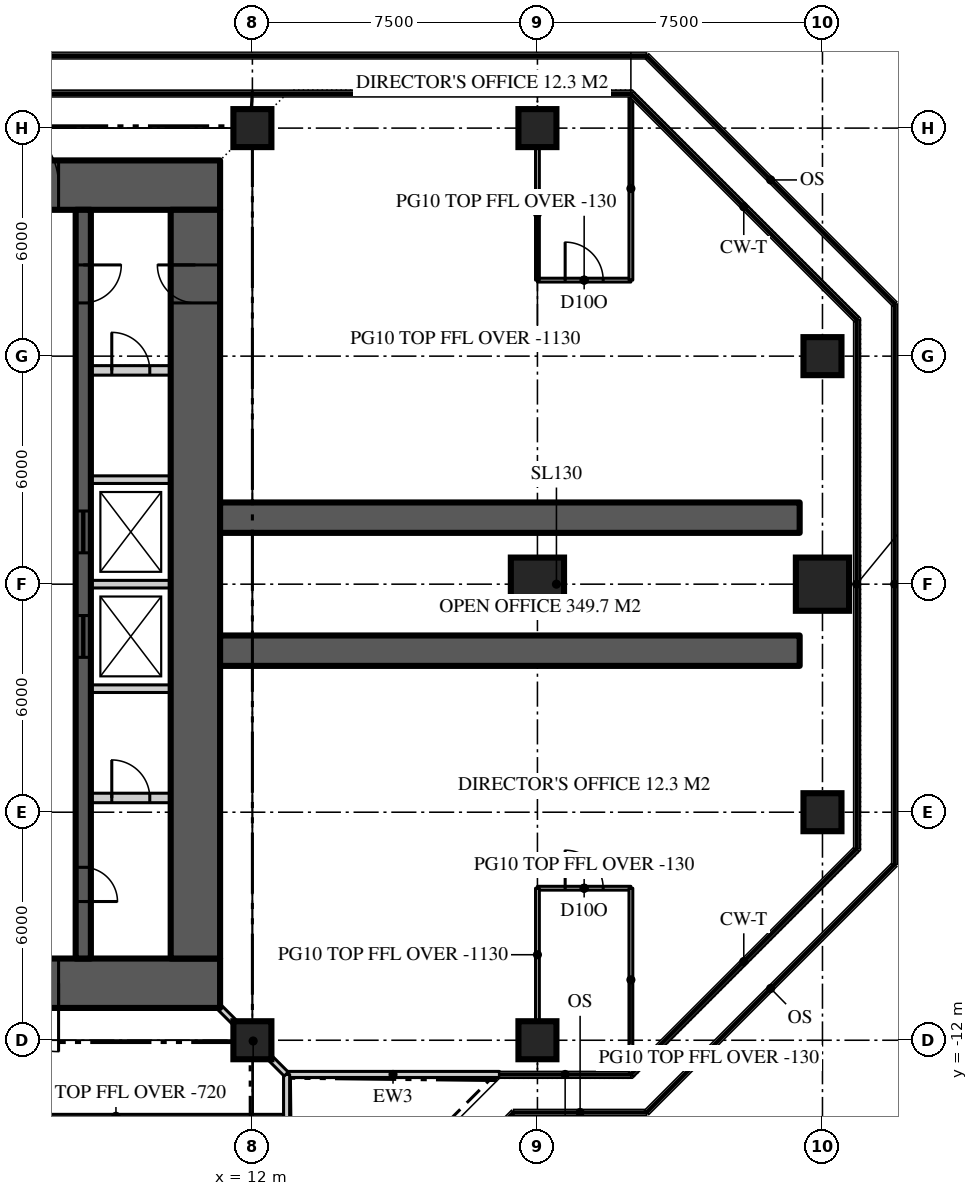
"""IFC4 building model, lengths in metres.
Left out: names, types, materials, properties, quantities, classifications, styles, units other than length and angle.
Written with IfcOpenShell. Run it as: python <this file> out.ifc"""

import sys

from ifc_helpers import new_model, si_unit, direction, frame, frame_2d, origin, origin_2d, place, context, subcontext, project, spatial, rectangle, extrude, element, fill, save


model = new_model("IFC4")
c1 = context("Model", 3, precision=1e-05, world=origin(), true_north=direction((0.0, 1.0)))
c2 = subcontext(c1, "Body", "Model", "MODEL_VIEW")
j1 = project(units=[si_unit("LENGTHUNIT", "METRE"), si_unit("PLANEANGLEUNIT", "RADIAN")], contexts=[c1])
p1 = place(None, origin())
s1 = spatial("IfcSite", under=j1, at=p1, CompositionType="ELEMENT")
p2 = place(p1, origin())
s2 = spatial("IfcBuilding", under=s1, at=p2, CompositionType="ELEMENT")
p3 = place(p2, frame((0.0, 0.0, 286.8)))
s3 = spatial("IfcBuildingStorey", under=s2, at=p3, CompositionType="ELEMENT", Elevation=286.8)
p4 = place(p3, frame((-11.15, 10.5, 0.0), z_axis=(0.0, 0.0, 1.0), x_axis=(1.0, 0.0, 0.0)))
e1 = element("IfcWall", 1, at=p4, inside=s3, PredefinedType="SHEAR", context=c2, shape_type="SweptSolid", body=[
    extrude(rectangle(XDim=22.3, YDim=1.3, at=frame_2d((11.15, 0.0))), origin(), (0.0, 0.0, 1.0), 3.9),
])
p5 = place(p4, frame((4.25, 0.0, 0.0)))
e2 = element("IfcOpeningElement", 2, at=p5, cuts=e1, PredefinedType="OPENING", context=c2, shape_type="SweptSolid", body=[
    extrude(rectangle(XDim=1.8, YDim=2.2, at=frame_2d((0.9, 1.1))), frame((0.0, 0.66, 0.0), z_axis=(0.0, -1.0, 0.0), x_axis=(1.0, 0.0, 0.0)), (0.0, 0.0, 1.0), 1.32),
])
p6 = place(p4, frame((16.25, 0.0, 0.0)))
e3 = element("IfcOpeningElement", 3, at=p6, cuts=e1, PredefinedType="OPENING", context=c2, shape_type="SweptSolid", body=[
    extrude(rectangle(XDim=1.8, YDim=2.2, at=frame_2d((0.9, 1.1))), frame((0.0, 0.66, 0.0), z_axis=(0.0, -1.0, 0.0), x_axis=(1.0, 0.0, 0.0)), (0.0, 0.0, 1.0), 1.32),
])
p7 = place(p3, frame((11.15, -10.5, 0.0), z_axis=(0.0, 0.0, 1.0), x_axis=(-1.0, 0.0, 0.0)))
e4 = element("IfcWall", 4, at=p7, inside=s3, PredefinedType="SHEAR", context=c2, shape_type="SweptSolid", body=[
    extrude(rectangle(XDim=22.3, YDim=1.3, at=frame_2d((11.15, 0.0))), origin(), (0.0, 0.0, 1.0), 3.9),
])
p8 = place(p7, frame((16.25, 0.0, 0.0)))
e5 = element("IfcOpeningElement", 5, at=p8, cuts=e4, PredefinedType="OPENING", context=c2, shape_type="SweptSolid", body=[
    extrude(rectangle(XDim=1.8, YDim=2.2, at=frame_2d((0.9, 1.1))), frame((0.0, 0.66, 0.0), z_axis=(0.0, -1.0, 0.0), x_axis=(1.0, 0.0, 0.0)), (0.0, 0.0, 1.0), 1.32),
])
p9 = place(p7, frame((4.25, 0.0, 0.0)))
e6 = element("IfcOpeningElement", 6, at=p9, cuts=e4, PredefinedType="OPENING", context=c2, shape_type="SweptSolid", body=[
    extrude(rectangle(XDim=1.8, YDim=2.2, at=frame_2d((0.9, 1.1))), frame((0.0, 0.66, 0.0), z_axis=(0.0, -1.0, 0.0), x_axis=(1.0, 0.0, 0.0)), (0.0, 0.0, 1.0), 1.32),
])
p10 = place(p3, frame((10.5, -9.85, 0.0), z_axis=(0.0, 0.0, 1.0), x_axis=(0.0, 1.0, 0.0)))
e7 = element("IfcWall", 7, at=p10, inside=s3, PredefinedType="SHEAR", context=c2, shape_type="SweptSolid", body=[
    extrude(rectangle(XDim=19.7, YDim=1.3, at=frame_2d((9.85, 0.0))), origin(), (0.0, 0.0, 1.0), 3.9),
])
p11 = place(p10, frame((17.25, 0.0, 0.0)))
e8 = element("IfcOpeningElement", 8, at=p11, cuts=e7, PredefinedType="OPENING", context=c2, shape_type="SweptSolid", body=[
    extrude(rectangle(XDim=1.0, YDim=2.2, at=frame_2d((0.5, 1.1))), frame((0.0, 0.66, 0.0), z_axis=(0.0, -1.0, 0.0), x_axis=(1.0, 0.0, 0.0)), (0.0, 0.0, 1.0), 1.32),
])
for number, where, z_axis, x_axis in (
    (9, (11.15, -1.75, 0.0), (0.0, 0.0, 1.0), (1.0, 0.0, 0.0)),
    (10, (11.15, 1.75, 0.0), (0.0, 0.0, 1.0), (1.0, 0.0, 0.0)),
):
    element("IfcWall", number, at=place(p3, frame(where, z_axis=z_axis, x_axis=x_axis)), inside=s3, PredefinedType="SHEAR", context=c2, shape_type="SweptSolid", body=[
        extrude(rectangle(XDim=15.25, YDim=0.8, at=frame_2d((7.625, 0.0))), origin(), (0.0, 0.0, 1.0), 3.9),
    ])
for number, where, z_axis, x_axis in (
    (11, (12.0, -12.0, 0.0), (0.0, 0.0, 1.0), (1.0, 0.0, 0.0)),
    (12, (19.5, -12.0, 0.0), (0.0, 0.0, 1.0), (1.0, 0.0, 0.0)),
    (13, (27.0, -6.0, 0.0), (0.0, 0.0, 1.0), (1.0, 0.0, 0.0)),
):
    element("IfcColumn", number, at=place(p3, frame(where, z_axis=z_axis, x_axis=x_axis)), inside=s3, PredefinedType="COLUMN", context=c2, shape_type="SweptSolid", body=[
        extrude(rectangle(XDim=1.0, YDim=1.0, at=origin_2d()), origin(), (0.0, 0.0, 1.0), 3.9),
    ])
for number, where, z_axis, x_axis in (
    (14, (19.5, 0.0, 0.0), (0.0, 0.0, 1.0), (1.0, 0.0, 0.0)),
    (15, (27.0, 0.0, 0.0), (0.0, 0.0, 1.0), (1.0, 0.0, 0.0)),
):
    element("IfcColumn", number, at=place(p3, frame(where, z_axis=z_axis, x_axis=x_axis)), inside=s3, PredefinedType="COLUMN", context=c2, shape_type="SweptSolid", body=[
        extrude(rectangle(XDim=1.4, YDim=1.4, at=origin_2d()), origin(), (0.0, 0.0, 1.0), 3.9),
    ])
for number, where, z_axis, x_axis in (
    (16, (27.0, 6.0, 0.0), (0.0, 0.0, 1.0), (1.0, 0.0, 0.0)),
    (17, (12.0, 12.0, 0.0), (0.0, 0.0, 1.0), (1.0, 0.0, 0.0)),
    (18, (19.5, 12.0, 0.0), (0.0, 0.0, 1.0), (1.0, 0.0, 0.0)),
):
    element("IfcColumn", number, at=place(p3, frame(where, z_axis=z_axis, x_axis=x_axis)), inside=s3, PredefinedType="COLUMN", context=c2, shape_type="SweptSolid", body=[
        extrude(rectangle(XDim=1.0, YDim=1.0, at=origin_2d()), origin(), (0.0, 0.0, 1.0), 3.9),
    ])
p12 = place(p3, frame((12.9, -12.9, 0.0), z_axis=(0.0, 0.0, 1.0), x_axis=(1.0, 0.0, 0.0)))
e19 = element("IfcWall", 19, at=p12, inside=s3, PredefinedType="SOLIDWALL", context=c2, shape_type="SweptSolid", body=[
    extrude(rectangle(XDim=5.6, YDim=0.16, at=frame_2d((2.8, 0.0))), origin(), (0.0, 0.0, 1.0), 3.77),
])
p13 = place(p3, frame((12.9, -18.5, 0.0), z_axis=(0.0, 0.0, 1.0), x_axis=(0.0, 1.0, 0.0)))
e20 = element("IfcWall", 20, at=p13, inside=s3, PredefinedType="SOLIDWALL", context=c2, shape_type="SweptSolid", body=[
    extrude(rectangle(XDim=5.6, YDim=0.16, at=frame_2d((2.8, 0.0))), origin(), (0.0, 0.0, 1.0), 3.77),
])
p14 = place(p13, frame((2.3, 0.0, 0.0)))
e21 = element("IfcOpeningElement", 21, at=p14, cuts=e20, PredefinedType="OPENING", context=c2, shape_type="SweptSolid", body=[
    extrude(rectangle(XDim=1.0, YDim=2.2, at=frame_2d((0.5, 1.1))), frame((0.0, 0.09, 0.0), z_axis=(0.0, -1.0, 0.0), x_axis=(1.0, 0.0, 0.0)), (0.0, 0.0, 1.0), 0.18),
])
p15 = place(p3, frame((7.55, 9.85, 0.0), z_axis=(0.0, 0.0, 1.0), x_axis=(0.0, -1.0, 0.0)))
e22 = element("IfcWall", 22, at=p15, inside=s3, PredefinedType="SHEAR", context=c2, shape_type="SweptSolid", body=[
    extrude(rectangle(XDim=19.7, YDim=0.4, at=frame_2d((9.85, 0.0))), origin(), (0.0, 0.0, 1.0), 3.9),
])
p16 = place(p15, frame((1.45, 0.0, 0.0)))
e23 = element("IfcOpeningElement", 23, at=p16, cuts=e22, PredefinedType="OPENING", context=c2, shape_type="SweptSolid", body=[
    extrude(rectangle(XDim=1.0, YDim=2.2, at=frame_2d((0.5, 1.1))), frame((0.0, 0.21, 0.0), z_axis=(0.0, -1.0, 0.0), x_axis=(1.0, 0.0, 0.0)), (0.0, 0.0, 1.0), 0.42),
])
p17 = place(p15, frame((17.3, 0.0, 0.0)))
e24 = element("IfcOpeningElement", 24, at=p17, cuts=e22, PredefinedType="OPENING", context=c2, shape_type="SweptSolid", body=[
    extrude(rectangle(XDim=0.9, YDim=2.1, at=frame_2d((0.45, 1.05))), frame((0.0, 0.21, 0.0), z_axis=(0.0, -1.0, 0.0), x_axis=(1.0, 0.0, 0.0)), (0.0, 0.0, 1.0), 0.42),
])
p18 = place(p15, frame((7.925, 0.0, 0.0)))
e25 = element("IfcOpeningElement", 25, at=p18, cuts=e22, PredefinedType="OPENING", context=c2, shape_type="SweptSolid", body=[
    extrude(rectangle(XDim=1.1, YDim=2.2, at=frame_2d((0.55, 1.1))), frame((0.0, 0.21, 0.0), z_axis=(0.0, -1.0, 0.0), x_axis=(1.0, 0.0, 0.0)), (0.0, 0.0, 1.0), 0.42),
])
p19 = place(p15, frame((10.675, 0.0, 0.0)))
e26 = element("IfcOpeningElement", 26, at=p19, cuts=e22, PredefinedType="OPENING", context=c2, shape_type="SweptSolid", body=[
    extrude(rectangle(XDim=1.1, YDim=2.2, at=frame_2d((0.55, 1.1))), frame((0.0, 0.21, 0.0), z_axis=(0.0, -1.0, 0.0), x_axis=(1.0, 0.0, 0.0)), (0.0, 0.0, 1.0), 0.42),
])
p20 = place(p3, frame((7.75, 5.625, 0.0), z_axis=(0.0, 0.0, 1.0), x_axis=(1.0, 0.0, 0.0)))
e27 = element("IfcWall", 27, at=p20, inside=s3, PredefinedType="SOLIDWALL", context=c2, shape_type="SweptSolid", body=[
    extrude(rectangle(XDim=2.1, YDim=0.25, at=frame_2d((1.05, 0.0))), origin(), (0.0, 0.0, 1.0), 3.7),
])
p21 = place(p20, frame((0.55, 0.0, 0.0)))
e28 = element("IfcOpeningElement", 28, at=p21, cuts=e27, PredefinedType="OPENING", context=c2, shape_type="SweptSolid", body=[
    extrude(rectangle(XDim=1.0, YDim=2.2, at=frame_2d((0.5, 1.1))), frame((0.0, 0.135, 0.0), z_axis=(0.0, -1.0, 0.0), x_axis=(1.0, 0.0, 0.0)), (0.0, 0.0, 1.0), 0.27),
])
p22 = place(p3, frame((7.75, -5.625, 0.0), z_axis=(0.0, 0.0, 1.0), x_axis=(1.0, 0.0, 0.0)))
e29 = element("IfcWall", 29, at=p22, inside=s3, PredefinedType="SOLIDWALL", context=c2, shape_type="SweptSolid", body=[
    extrude(rectangle(XDim=2.1, YDim=0.25, at=frame_2d((1.05, 0.0))), origin(), (0.0, 0.0, 1.0), 3.7),
])
p23 = place(p22, frame((0.55, 0.0, 0.0)))
e30 = element("IfcOpeningElement", 30, at=p23, cuts=e29, PredefinedType="OPENING", context=c2, shape_type="SweptSolid", body=[
    extrude(rectangle(XDim=1.0, YDim=2.2, at=frame_2d((0.5, 1.1))), frame((0.0, 0.135, 0.0), z_axis=(0.0, -1.0, 0.0), x_axis=(1.0, 0.0, 0.0)), (0.0, 0.0, 1.0), 0.27),
])
for number, where, z_axis, x_axis in (
    (31, (7.75, -2.75, 0.0), (0.0, 0.0, 1.0), (1.0, 0.0, 0.0)),
    (32, (7.75, 0.0, 0.0), (0.0, 0.0, 1.0), (1.0, 0.0, 0.0)),
    (33, (7.75, 2.75, 0.0), (0.0, 0.0, 1.0), (1.0, 0.0, 0.0)),
):
    element("IfcWall", number, at=place(p3, frame(where, z_axis=z_axis, x_axis=x_axis)), inside=s3, PredefinedType="SOLIDWALL", context=c2, shape_type="SweptSolid", body=[
        extrude(rectangle(XDim=2.1, YDim=0.2, at=frame_2d((1.05, 0.0))), origin(), (0.0, 0.0, 1.0), 3.7),
    ])
p24 = place(p3, frame((19.5, 8.0, 0.0), z_axis=(0.0, 0.0, 1.0), x_axis=(1.0, 0.0, 0.0)))
e34 = element("IfcWall", 34, at=p24, inside=s3, PredefinedType="PARTITIONING", context=c2, shape_type="SweptSolid", body=[
    extrude(rectangle(XDim=2.459, YDim=0.1, at=frame_2d((1.229, 0.0))), origin(), (0.0, 0.0, 1.0), 3.77),
])
p25 = place(p24, frame((0.729, 0.0, 0.0)))
e35 = element("IfcOpeningElement", 35, at=p25, cuts=e34, PredefinedType="OPENING", context=c2, shape_type="SweptSolid", body=[
    extrude(rectangle(XDim=1.0, YDim=2.2, at=frame_2d((0.5, 1.1))), frame((0.0, 0.06, 0.0), z_axis=(0.0, -1.0, 0.0), x_axis=(1.0, 0.0, 0.0)), (0.0, 0.0, 1.0), 0.12),
])
p26 = place(p3, frame((19.5, 8.0, 0.0), z_axis=(0.0, 0.0, 1.0), x_axis=(0.0, 1.0, 0.0)))
e36 = element("IfcWall", 36, at=p26, inside=s3, PredefinedType="PARTITIONING", context=c2, shape_type="SweptSolid", body=[
    extrude(rectangle(XDim=3.5, YDim=0.1, at=frame_2d((1.75, 0.0))), origin(), (0.0, 0.0, 1.0), 2.77),
])
p27 = place(p3, frame((21.959, 8.0, 0.0), z_axis=(0.0, 0.0, 1.0), x_axis=(0.0, 1.0, 0.0)))
e37 = element("IfcWall", 37, at=p27, inside=s3, PredefinedType="PARTITIONING", context=c2, shape_type="SweptSolid", body=[
    extrude(rectangle(XDim=4.82, YDim=0.1, at=frame_2d((2.41, 0.0))), origin(), (0.0, 0.0, 1.0), 3.77),
])
p28 = place(p3, frame((19.5, -8.0, 0.0), z_axis=(0.0, 0.0, 1.0), x_axis=(1.0, 0.0, 0.0)))
e38 = element("IfcWall", 38, at=p28, inside=s3, PredefinedType="PARTITIONING", context=c2, shape_type="SweptSolid", body=[
    extrude(rectangle(XDim=2.459, YDim=0.1, at=frame_2d((1.229, 0.0))), origin(), (0.0, 0.0, 1.0), 3.77),
])
p29 = place(p28, frame((0.729, 0.0, 0.0)))
e39 = element("IfcOpeningElement", 39, at=p29, cuts=e38, PredefinedType="OPENING", context=c2, shape_type="SweptSolid", body=[
    extrude(rectangle(XDim=1.0, YDim=2.2, at=frame_2d((0.5, 1.1))), frame((0.0, 0.06, 0.0), z_axis=(0.0, -1.0, 0.0), x_axis=(1.0, 0.0, 0.0)), (0.0, 0.0, 1.0), 0.12),
])
p30 = place(p3, frame((19.5, -8.0, 0.0), z_axis=(0.0, 0.0, 1.0), x_axis=(0.0, -1.0, 0.0)))
e40 = element("IfcWall", 40, at=p30, inside=s3, PredefinedType="PARTITIONING", context=c2, shape_type="SweptSolid", body=[
    extrude(rectangle(XDim=3.5, YDim=0.1, at=frame_2d((1.75, 0.0))), origin(), (0.0, 0.0, 1.0), 2.77),
])
p31 = place(p3, frame((21.959, -8.0, 0.0), z_axis=(0.0, 0.0, 1.0), x_axis=(0.0, -1.0, 0.0)))
e41 = element("IfcWall", 41, at=p31, inside=s3, PredefinedType="PARTITIONING", context=c2, shape_type="SweptSolid", body=[
    extrude(rectangle(XDim=4.82, YDim=0.1, at=frame_2d((2.41, 0.0))), origin(), (0.0, 0.0, 1.0), 3.77),
])
p32 = place(p3, frame((4.0, -14.0, 0.0), z_axis=(0.0, 0.0, 1.0), x_axis=(1.0, 0.0, 0.0)))
e42 = element("IfcWall", 42, at=p32, inside=s3, PredefinedType="PARTITIONING", context=c2, shape_type="SweptSolid", body=[
    extrude(rectangle(XDim=8.82, YDim=0.1, at=frame_2d((4.41, 0.0))), origin(), (0.0, 0.0, 1.0), 3.18),
])
p33 = place(p3, frame((11.15, -11.15, 0.0), z_axis=(0.0, 0.0, 1.0), x_axis=(0.707106781187, -0.707106781187, 0.0)))
e43 = element("IfcWall", 43, at=p33, inside=s3, PredefinedType="PARTITIONING", context=c2, shape_type="SweptSolid", body=[
    extrude(rectangle(XDim=2.461, YDim=0.15, at=frame_2d((1.23, 0.0))), origin(), (0.0, 0.0, 1.0), 3.22),
])
p34 = place(p6, origin())
e44 = element("IfcDoor", 44, at=p34, inside=s3, OperationType="DOUBLE_DOOR_DOUBLE_SWING", PredefinedType="DOOR", context=c2, shape_type="SweptSolid", body=[
    extrude(rectangle(XDim=1.8, YDim=2.2, at=frame_2d((0.9, 1.1))), frame((0.0, 0.025, 0.0), z_axis=(0.0, -1.0, 0.0), x_axis=(1.0, 0.0, 0.0)), (0.0, 0.0, 1.0), 0.05),
])
fill(e3, e44)
p35 = place(p9, origin())
e45 = element("IfcDoor", 45, at=p35, inside=s3, OperationType="DOUBLE_DOOR_DOUBLE_SWING", PredefinedType="DOOR", context=c2, shape_type="SweptSolid", body=[
    extrude(rectangle(XDim=1.8, YDim=2.2, at=frame_2d((0.9, 1.1))), frame((0.0, 0.025, 0.0), z_axis=(0.0, -1.0, 0.0), x_axis=(1.0, 0.0, 0.0)), (0.0, 0.0, 1.0), 0.05),
])
fill(e6, e45)
p36 = place(p16, origin())
e46 = element("IfcDoor", 46, at=p36, inside=s3, OperationType="SINGLE_SWING_LEFT", PredefinedType="DOOR", context=c2, shape_type="SweptSolid", body=[
    extrude(rectangle(XDim=1.0, YDim=2.2, at=frame_2d((0.5, 1.1))), frame((0.0, 0.025, 0.0), z_axis=(0.0, -1.0, 0.0), x_axis=(1.0, 0.0, 0.0)), (0.0, 0.0, 1.0), 0.05),
])
fill(e23, e46)
p37 = place(p11, origin())
e47 = element("IfcDoor", 47, at=p37, inside=s3, OperationType="SINGLE_SWING_RIGHT", PredefinedType="DOOR", context=c2, shape_type="SweptSolid", body=[
    extrude(rectangle(XDim=1.0, YDim=2.2, at=frame_2d((0.5, 1.1))), frame((0.0, 0.025, 0.0), z_axis=(0.0, -1.0, 0.0), x_axis=(1.0, 0.0, 0.0)), (0.0, 0.0, 1.0), 0.05),
])
fill(e8, e47)
p38 = place(p17, origin())
e48 = element("IfcDoor", 48, at=p38, inside=s3, OperationType="SINGLE_SWING_RIGHT", PredefinedType="DOOR", context=c2, shape_type="SweptSolid", body=[
    extrude(rectangle(XDim=0.9, YDim=2.1, at=frame_2d((0.45, 1.05))), frame((0.0, 0.025, 0.0), z_axis=(0.0, -1.0, 0.0), x_axis=(1.0, 0.0, 0.0)), (0.0, 0.0, 1.0), 0.05),
])
fill(e24, e48)
p39 = place(p18, origin())
e49 = element("IfcDoor", 49, at=p39, inside=s3, OperationType="SLIDING_TO_LEFT", PredefinedType="DOOR", context=c2, shape_type="SweptSolid", body=[
    extrude(rectangle(XDim=1.1, YDim=2.2, at=frame_2d((0.55, 1.1))), frame((0.0, 0.025, 0.0), z_axis=(0.0, -1.0, 0.0), x_axis=(1.0, 0.0, 0.0)), (0.0, 0.0, 1.0), 0.05),
])
fill(e25, e49)
p40 = place(p19, origin())
e50 = element("IfcDoor", 50, at=p40, inside=s3, OperationType="SLIDING_TO_LEFT", PredefinedType="DOOR", context=c2, shape_type="SweptSolid", body=[
    extrude(rectangle(XDim=1.1, YDim=2.2, at=frame_2d((0.55, 1.1))), frame((0.0, 0.025, 0.0), z_axis=(0.0, -1.0, 0.0), x_axis=(1.0, 0.0, 0.0)), (0.0, 0.0, 1.0), 0.05),
])
fill(e26, e50)
p41 = place(p25, origin())
e51 = element("IfcDoor", 51, at=p41, inside=s3, OperationType="SINGLE_SWING_LEFT", PredefinedType="DOOR", context=c2, shape_type="SweptSolid", body=[
    extrude(rectangle(XDim=1.0, YDim=2.2, at=frame_2d((0.5, 1.1))), frame((0.0, 0.025, 0.0), z_axis=(0.0, -1.0, 0.0), x_axis=(1.0, 0.0, 0.0)), (0.0, 0.0, 1.0), 0.05),
])
fill(e35, e51)
p42 = place(p29, origin())
e52 = element("IfcDoor", 52, at=p42, inside=s3, OperationType="SINGLE_SWING_LEFT", PredefinedType="DOOR", context=c2, shape_type="SweptSolid", body=[
    extrude(rectangle(XDim=1.0, YDim=2.2, at=frame_2d((0.5, 1.1))), frame((0.0, 0.025, 0.0), z_axis=(0.0, -1.0, 0.0), x_axis=(1.0, 0.0, 0.0)), (0.0, 0.0, 1.0), 0.05),
])
fill(e39, e52)
p43 = place(p21, origin())
e53 = element("IfcDoor", 53, at=p43, inside=s3, OperationType="SINGLE_SWING_LEFT", PredefinedType="DOOR", context=c2, shape_type="SweptSolid", body=[
    extrude(rectangle(XDim=1.0, YDim=2.2, at=frame_2d((0.5, 1.1))), frame((0.0, 0.025, 0.0), z_axis=(0.0, -1.0, 0.0), x_axis=(1.0, 0.0, 0.0)), (0.0, 0.0, 1.0), 0.05),
])
fill(e28, e53)
p44 = place(p23, origin())
e54 = element("IfcDoor", 54, at=p44, inside=s3, OperationType="SINGLE_SWING_LEFT", PredefinedType="DOOR", context=c2, shape_type="SweptSolid", body=[
    extrude(rectangle(XDim=1.0, YDim=2.2, at=frame_2d((0.5, 1.1))), frame((0.0, 0.025, 0.0), z_axis=(0.0, -1.0, 0.0), x_axis=(1.0, 0.0, 0.0)), (0.0, 0.0, 1.0), 0.05),
])
fill(e30, e54)
save(model, sys.argv[1])
